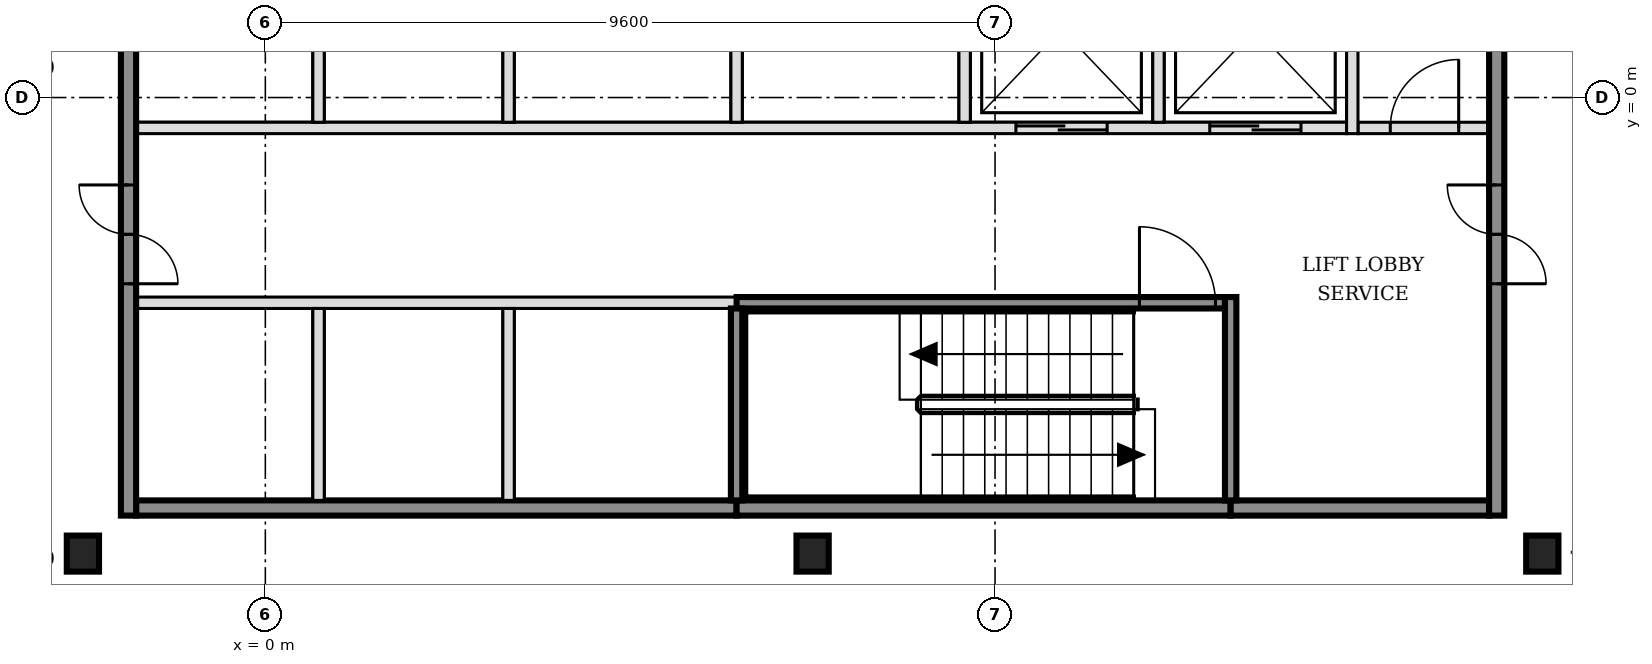
"""IFC4 building model, lengths in metres.
Left out: names, types, materials, properties, quantities, classifications, styles, units other than length and angle.
Written with IfcOpenShell. Run it as: python <this file> out.ifc"""

import sys

from ifc_helpers import new_model, si_unit, direction, frame, frame_2d, origin, origin_2d, place, context, subcontext, project, spatial, rectangle, i_section, extrude, element, fill, save


model = new_model("IFC4")
c1 = context("Model", 3, precision=1e-05, world=origin(), true_north=direction((0.0, 1.0)))
c2 = subcontext(c1, "Body", "Model", "MODEL_VIEW")
j1 = project(units=[si_unit("LENGTHUNIT", "METRE"), si_unit("PLANEANGLEUNIT", "RADIAN")], contexts=[c1])
p1 = place(None, origin())
s1 = spatial("IfcSite", under=j1, at=p1, CompositionType="ELEMENT")
p2 = place(p1, origin())
s2 = spatial("IfcBuilding", under=s1, at=p2, CompositionType="ELEMENT")
p3 = place(p2, frame((0.0, 0.0, 129.0)))
s3 = spatial("IfcBuildingStorey", under=s2, at=p3, CompositionType="ELEMENT", Elevation=129.0)
for number, where, z_axis, x_axis in (
    (1, (-2.4, -6.0, -0.15), (0.0, 0.0, 1.0), (1.0, 0.0, 0.0)),
    (2, (7.2, -6.0, -0.15), (0.0, 0.0, 1.0), (1.0, 0.0, 0.0)),
    (3, (16.8, -6.0, -0.15), (0.0, 0.0, 1.0), (1.0, 0.0, 0.0)),
):
    element("IfcColumn", number, at=place(p3, frame(where, z_axis=z_axis, x_axis=x_axis)), inside=s3, PredefinedType="COLUMN", context=c2, shape_type="SweptSolid", body=[
        extrude(i_section(OverallWidth=0.424, OverallDepth=0.474, WebThickness=0.048, FlangeThickness=0.077, FilletRadius=0.015, at=origin_2d()), origin(), (0.0, 0.0, 1.0), 3.6),
    ])
p4 = place(p3, frame((-1.7, -5.4, 0.0), z_axis=(0.0, 0.0, 1.0), x_axis=(1.0, 0.0, 0.0)))
e4 = element("IfcWall", 4, at=p4, inside=s3, PredefinedType="SOLIDWALL", context=c2, shape_type="SweptSolid", body=[
    extrude(rectangle(XDim=7.9, YDim=0.2, at=frame_2d((3.95, 0.0))), origin(), (0.0, 0.0, 1.0), 3.45),
])
p5 = place(p3, frame((6.2, -5.4, 0.0), z_axis=(0.0, 0.0, 1.0), x_axis=(1.0, 0.0, 0.0)))
e5 = element("IfcWall", 5, at=p5, inside=s3, PredefinedType="SOLIDWALL", context=c2, shape_type="SweptSolid", body=[
    extrude(rectangle(XDim=6.5, YDim=0.2, at=frame_2d((3.25, 0.0))), origin(), (0.0, 0.0, 1.0), 3.45),
])
p6 = place(p3, frame((12.7, -5.4, 0.0), z_axis=(0.0, 0.0, 1.0), x_axis=(1.0, 0.0, 0.0)))
e6 = element("IfcWall", 6, at=p6, inside=s3, PredefinedType="SOLIDWALL", context=c2, shape_type="SweptSolid", body=[
    extrude(rectangle(XDim=3.4, YDim=0.2, at=frame_2d((1.7, 0.0))), origin(), (0.0, 0.0, 1.0), 3.45),
])
p7 = place(p3, frame((-1.7, -2.7, 0.0), z_axis=(0.0, 0.0, 1.0), x_axis=(1.0, 0.0, 0.0)))
e7 = element("IfcWall", 7, at=p7, inside=s3, PredefinedType="SOLIDWALL", context=c2, shape_type="SweptSolid", body=[
    extrude(rectangle(XDim=7.9, YDim=0.15, at=frame_2d((3.95, 0.0))), origin(), (0.0, 0.0, 1.0), 3.45),
])
p8 = place(p3, frame((6.2, -2.7, 0.0), z_axis=(0.0, 0.0, 1.0), x_axis=(1.0, 0.0, 0.0)))
e8 = element("IfcWall", 8, at=p8, inside=s3, PredefinedType="SOLIDWALL", context=c2, shape_type="SweptSolid", body=[
    extrude(rectangle(XDim=6.425, YDim=0.15, at=frame_2d((3.212, 0.0))), origin(), (0.0, 0.0, 1.0), 3.45),
])
p9 = place(p8, frame((5.3, 0.0, 0.0)))
e9 = element("IfcOpeningElement", 9, at=p9, cuts=e8, PredefinedType="OPENING", context=c2, shape_type="SweptSolid", body=[
    extrude(rectangle(XDim=1.0, YDim=2.1, at=frame_2d((0.5, 1.05))), frame((0.0, 0.085, 0.0), z_axis=(0.0, -1.0, 0.0), x_axis=(1.0, 0.0, 0.0)), (0.0, 0.0, 1.0), 0.17),
])
p10 = place(p3, frame((-1.7, -0.4, 0.0), z_axis=(0.0, 0.0, 1.0), x_axis=(1.0, 0.0, 0.0)))
e10 = element("IfcWall", 10, at=p10, inside=s3, PredefinedType="SOLIDWALL", context=c2, shape_type="SweptSolid", body=[
    extrude(rectangle(XDim=15.925, YDim=0.15, at=frame_2d((7.962, 0.0))), origin(), (0.0, 0.0, 1.0), 3.45),
])
p11 = place(p10, frame((11.575, 0.0, 0.0)))
e11 = element("IfcOpeningElement", 11, at=p11, cuts=e10, PredefinedType="OPENING", context=c2, shape_type="SweptSolid", body=[
    extrude(rectangle(XDim=1.2, YDim=2.1, at=frame_2d((0.6, 1.05))), frame((0.0, 0.085, 0.0), z_axis=(0.0, -1.0, 0.0), x_axis=(1.0, 0.0, 0.0)), (0.0, 0.0, 1.0), 0.17),
])
p12 = place(p10, frame((14.125, 0.0, 0.0)))
e12 = element("IfcOpeningElement", 12, at=p12, cuts=e10, PredefinedType="OPENING", context=c2, shape_type="SweptSolid", body=[
    extrude(rectangle(XDim=1.2, YDim=2.1, at=frame_2d((0.6, 1.05))), frame((0.0, 0.085, 0.0), z_axis=(0.0, -1.0, 0.0), x_axis=(1.0, 0.0, 0.0)), (0.0, 0.0, 1.0), 0.17),
])
p13 = place(p3, frame((14.375, -0.4, 0.0), z_axis=(0.0, 0.0, 1.0), x_axis=(1.0, 0.0, 0.0)))
e13 = element("IfcWall", 13, at=p13, inside=s3, PredefinedType="PARTITIONING", context=c2, shape_type="SweptSolid", body=[
    extrude(rectangle(XDim=1.725, YDim=0.15, at=frame_2d((0.863, 0.0))), origin(), (0.0, 0.0, 1.0), 3.45),
])
p14 = place(p13, frame((0.425, 0.0, 0.0)))
e14 = element("IfcOpeningElement", 14, at=p14, cuts=e13, PredefinedType="OPENING", context=c2, shape_type="SweptSolid", body=[
    extrude(rectangle(XDim=0.9, YDim=2.1, at=frame_2d((0.45, 1.05))), frame((0.0, 0.085, 0.0), z_axis=(0.0, -1.0, 0.0), x_axis=(1.0, 0.0, 0.0)), (0.0, 0.0, 1.0), 0.17),
])
p15 = place(p3, frame((-1.8, -5.5, 0.0), z_axis=(0.0, 0.0, 1.0), x_axis=(0.0, 1.0, 0.0)))
e15 = element("IfcWall", 15, at=p15, inside=s3, PredefinedType="SOLIDWALL", context=c2, shape_type="SweptSolid", body=[
    extrude(rectangle(XDim=15.8, YDim=0.2, at=frame_2d((7.9, 0.0))), origin(), (0.0, 0.0, 1.0), 3.45),
])
p16 = place(p15, frame((3.05, 0.0, 0.0)))
e16 = element("IfcOpeningElement", 16, at=p16, cuts=e15, PredefinedType="OPENING", context=c2, shape_type="SweptSolid", body=[
    extrude(rectangle(XDim=1.3, YDim=2.1, at=frame_2d((0.65, 1.05))), frame((0.0, 0.11, 0.0), z_axis=(0.0, -1.0, 0.0), x_axis=(1.0, 0.0, 0.0)), (0.0, 0.0, 1.0), 0.22),
])
p17 = place(p15, frame((11.45, 0.0, 0.0)))
e17 = element("IfcOpeningElement", 17, at=p17, cuts=e15, PredefinedType="OPENING", context=c2, shape_type="SweptSolid", body=[
    extrude(rectangle(XDim=1.3, YDim=2.1, at=frame_2d((0.65, 1.05))), frame((0.0, 0.11, 0.0), z_axis=(0.0, -1.0, 0.0), x_axis=(1.0, 0.0, 0.0)), (0.0, 0.0, 1.0), 0.22),
])
p18 = place(p3, frame((0.7, -5.3, 0.0), z_axis=(0.0, 0.0, 1.0), x_axis=(0.0, 1.0, 0.0)))
e18 = element("IfcWall", 18, at=p18, inside=s3, PredefinedType="SOLIDWALL", context=c2, shape_type="SweptSolid", body=[
    extrude(rectangle(XDim=2.525, YDim=0.15, at=frame_2d((1.263, 0.0))), origin(), (0.0, 0.0, 1.0), 3.45),
])
p19 = place(p3, frame((0.7, -0.325, 0.0), z_axis=(0.0, 0.0, 1.0), x_axis=(0.0, 1.0, 0.0)))
e19 = element("IfcWall", 19, at=p19, inside=s3, PredefinedType="SOLIDWALL", context=c2, shape_type="SweptSolid", body=[
    extrude(rectangle(XDim=2.45, YDim=0.15, at=frame_2d((1.225, 0.0))), origin(), (0.0, 0.0, 1.0), 3.45),
])
p20 = place(p3, frame((3.2, -5.3, 0.0), z_axis=(0.0, 0.0, 1.0), x_axis=(0.0, 1.0, 0.0)))
e20 = element("IfcWall", 20, at=p20, inside=s3, PredefinedType="SOLIDWALL", context=c2, shape_type="SweptSolid", body=[
    extrude(rectangle(XDim=2.525, YDim=0.15, at=frame_2d((1.263, 0.0))), origin(), (0.0, 0.0, 1.0), 3.45),
])
p21 = place(p3, frame((3.2, -0.325, 0.0), z_axis=(0.0, 0.0, 1.0), x_axis=(0.0, 1.0, 0.0)))
e21 = element("IfcWall", 21, at=p21, inside=s3, PredefinedType="SOLIDWALL", context=c2, shape_type="SweptSolid", body=[
    extrude(rectangle(XDim=2.45, YDim=0.15, at=frame_2d((1.225, 0.0))), origin(), (0.0, 0.0, 1.0), 3.45),
])
p22 = place(p3, frame((6.2, -5.3, 0.0), z_axis=(0.0, 0.0, 1.0), x_axis=(0.0, 1.0, 0.0)))
e22 = element("IfcWall", 22, at=p22, inside=s3, PredefinedType="SOLIDWALL", context=c2, shape_type="SweptSolid", body=[
    extrude(rectangle(XDim=2.525, YDim=0.15, at=frame_2d((1.263, 0.0))), origin(), (0.0, 0.0, 1.0), 3.45),
])
for number, where, z_axis, x_axis in (
    (23, (6.2, -0.325, 0.0), (0.0, 0.0, 1.0), (0.0, 1.0, 0.0)),
    (24, (9.2, -0.325, 0.0), (0.0, 0.0, 1.0), (0.0, 1.0, 0.0)),
    (25, (11.75, -0.325, 0.0), (0.0, 0.0, 1.0), (0.0, 1.0, 0.0)),
):
    element("IfcWall", number, at=place(p3, frame(where, z_axis=z_axis, x_axis=x_axis)), inside=s3, PredefinedType="SOLIDWALL", context=c2, shape_type="SweptSolid", body=[
        extrude(rectangle(XDim=2.45, YDim=0.15, at=frame_2d((1.225, 0.0))), origin(), (0.0, 0.0, 1.0), 3.45),
    ])
p23 = place(p3, frame((12.7, -5.3, 0.0), z_axis=(0.0, 0.0, 1.0), x_axis=(0.0, 1.0, 0.0)))
e26 = element("IfcWall", 26, at=p23, inside=s3, PredefinedType="SOLIDWALL", context=c2, shape_type="SweptSolid", body=[
    extrude(rectangle(XDim=2.675, YDim=0.15, at=frame_2d((1.337, 0.0))), origin(), (0.0, 0.0, 1.0), 3.45),
])
p24 = place(p3, frame((14.3, -0.475, 0.0), z_axis=(0.0, 0.0, 1.0), x_axis=(0.0, 1.0, 0.0)))
e27 = element("IfcWall", 27, at=p24, inside=s3, PredefinedType="SOLIDWALL", context=c2, shape_type="SweptSolid", body=[
    extrude(rectangle(XDim=2.75, YDim=0.15, at=frame_2d((1.375, 0.0))), origin(), (0.0, 0.0, 1.0), 3.45),
])
p25 = place(p3, frame((16.2, -5.5, 0.0), z_axis=(0.0, 0.0, 1.0), x_axis=(0.0, 1.0, 0.0)))
e28 = element("IfcWall", 28, at=p25, inside=s3, PredefinedType="SOLIDWALL", context=c2, shape_type="SweptSolid", body=[
    extrude(rectangle(XDim=15.8, YDim=0.2, at=frame_2d((7.9, 0.0))), origin(), (0.0, 0.0, 1.0), 3.45),
])
p26 = place(p25, frame((3.05, 0.0, 0.0)))
e29 = element("IfcOpeningElement", 29, at=p26, cuts=e28, PredefinedType="OPENING", context=c2, shape_type="SweptSolid", body=[
    extrude(rectangle(XDim=1.3, YDim=2.1, at=frame_2d((0.65, 1.05))), frame((0.0, 0.11, 0.0), z_axis=(0.0, -1.0, 0.0), x_axis=(1.0, 0.0, 0.0)), (0.0, 0.0, 1.0), 0.22),
])
p27 = place(p25, frame((11.45, 0.0, 0.0)))
e30 = element("IfcOpeningElement", 30, at=p27, cuts=e28, PredefinedType="OPENING", context=c2, shape_type="SweptSolid", body=[
    extrude(rectangle(XDim=1.3, YDim=2.1, at=frame_2d((0.65, 1.05))), frame((0.0, 0.11, 0.0), z_axis=(0.0, -1.0, 0.0), x_axis=(1.0, 0.0, 0.0)), (0.0, 0.0, 1.0), 0.22),
])
p28 = place(p11, origin())
e31 = element("IfcDoor", 31, at=p28, inside=s3, OperationType="DOUBLE_DOOR_SLIDING", PredefinedType="DOOR", context=c2, shape_type="SweptSolid", body=[
    extrude(rectangle(XDim=1.2, YDim=2.1, at=frame_2d((0.6, 1.05))), frame((0.0, 0.025, 0.0), z_axis=(0.0, -1.0, 0.0), x_axis=(1.0, 0.0, 0.0)), (0.0, 0.0, 1.0), 0.05),
])
fill(e11, e31)
p29 = place(p12, origin())
e32 = element("IfcDoor", 32, at=p29, inside=s3, OperationType="DOUBLE_DOOR_SLIDING", PredefinedType="DOOR", context=c2, shape_type="SweptSolid", body=[
    extrude(rectangle(XDim=1.2, YDim=2.1, at=frame_2d((0.6, 1.05))), frame((0.0, 0.025, 0.0), z_axis=(0.0, -1.0, 0.0), x_axis=(1.0, 0.0, 0.0)), (0.0, 0.0, 1.0), 0.05),
])
fill(e12, e32)
p30 = place(p9, origin())
e33 = element("IfcDoor", 33, at=p30, inside=s3, OperationType="SINGLE_SWING_LEFT", PredefinedType="DOOR", context=c2, shape_type="SweptSolid", body=[
    extrude(rectangle(XDim=1.0, YDim=2.1, at=frame_2d((0.5, 1.05))), frame((0.0, 0.025, 0.0), z_axis=(0.0, -1.0, 0.0), x_axis=(1.0, 0.0, 0.0)), (0.0, 0.0, 1.0), 0.05),
])
fill(e9, e33)
p31 = place(p16, origin())
e34 = element("IfcDoor", 34, at=p31, inside=s3, OperationType="DOUBLE_DOOR_SINGLE_SWING", PredefinedType="DOOR", context=c2, shape_type="SweptSolid", body=[
    extrude(rectangle(XDim=1.3, YDim=2.1, at=frame_2d((0.65, 1.05))), frame((0.0, 0.025, 0.0), z_axis=(0.0, -1.0, 0.0), x_axis=(1.0, 0.0, 0.0)), (0.0, 0.0, 1.0), 0.05),
])
fill(e16, e34)
p32 = place(p26, origin())
e35 = element("IfcDoor", 35, at=p32, inside=s3, OperationType="DOUBLE_DOOR_SINGLE_SWING", PredefinedType="DOOR", context=c2, shape_type="SweptSolid", body=[
    extrude(rectangle(XDim=1.3, YDim=2.1, at=frame_2d((0.65, 1.05))), frame((0.0, 0.025, 0.0), z_axis=(0.0, -1.0, 0.0), x_axis=(1.0, 0.0, 0.0)), (0.0, 0.0, 1.0), 0.05),
])
fill(e29, e35)
p33 = place(p14, origin())
e36 = element("IfcDoor", 36, at=p33, inside=s3, OperationType="SINGLE_SWING_RIGHT", PredefinedType="DOOR", context=c2, shape_type="SweptSolid", body=[
    extrude(rectangle(XDim=0.9, YDim=2.1, at=frame_2d((0.45, 1.05))), frame((0.0, 0.025, 0.0), z_axis=(0.0, -1.0, 0.0), x_axis=(1.0, 0.0, 0.0)), (0.0, 0.0, 1.0), 0.05),
])
fill(e14, e36)
save(model, sys.argv[1])
